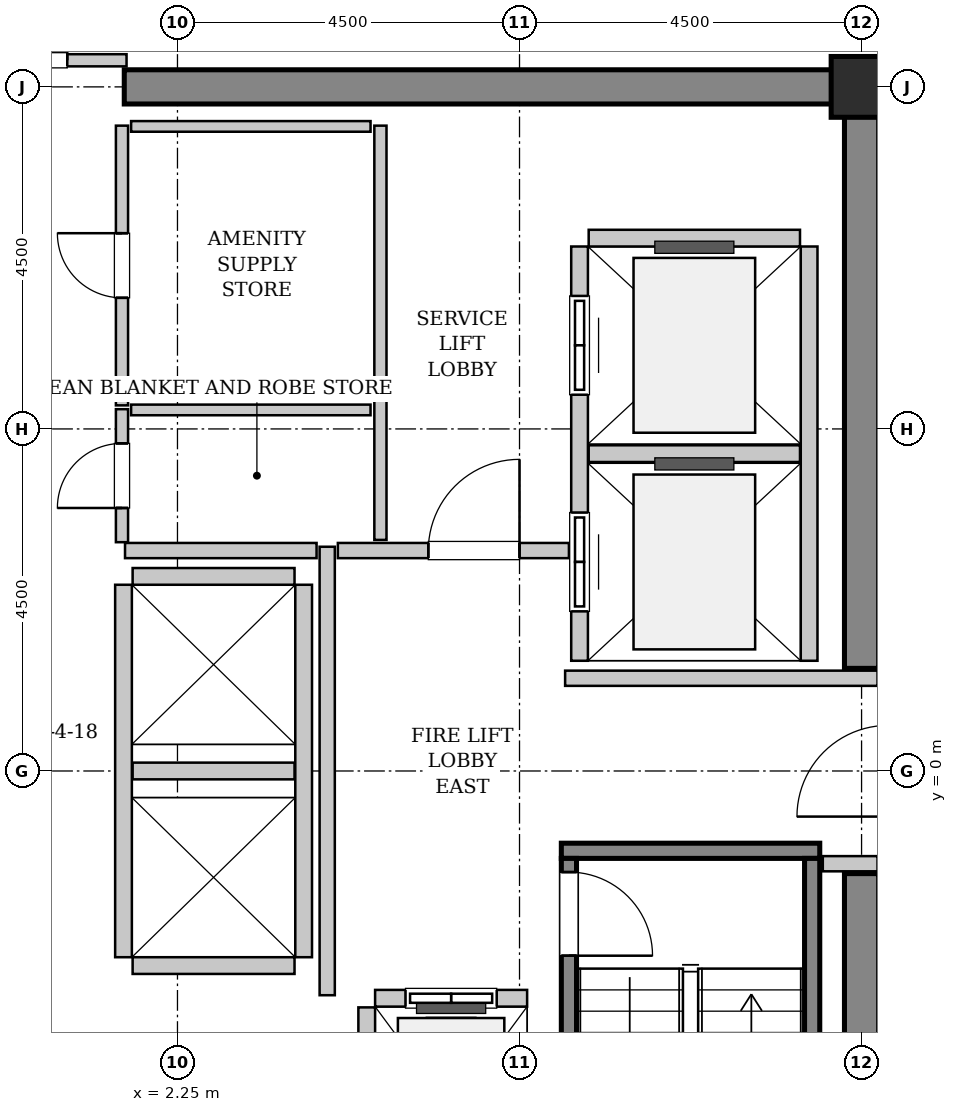
"""IFC4 building model, lengths in metres.
Left out: names, types, materials, properties, quantities, classifications, styles, units other than length and angle.
Written with IfcOpenShell. Run it as: python <this file> out.ifc"""

import sys

from ifc_helpers import new_model, si_unit, direction, frame, frame_2d, origin, origin_2d, place, context, subcontext, project, spatial, rectangle, hollow_rectangle, extrude, source, transform, mapped, element, fill, save


model = new_model("IFC4")
c1 = context("Model", 3, precision=1e-05, world=origin(), true_north=direction((0.0, 1.0)))
c2 = subcontext(c1, "Body", "Model", "MODEL_VIEW")
j1 = project(units=[si_unit("LENGTHUNIT", "METRE"), si_unit("PLANEANGLEUNIT", "RADIAN")], contexts=[c1])
p1 = place(None, origin())
s1 = spatial("IfcSite", under=j1, at=p1, CompositionType="ELEMENT")
p2 = place(p1, origin())
s2 = spatial("IfcBuilding", under=s1, at=p2, CompositionType="ELEMENT")
p3 = place(p2, frame((0.0, 0.0, 206.6)))
s3 = spatial("IfcBuildingStorey", under=s2, at=p3, CompositionType="ELEMENT", Elevation=206.6)
m1 = source(origin(), c2, "Body", "SweptSolid", [
    extrude(rectangle(XDim=9.925, YDim=0.45, at=frame_2d((4.962, 0.0))), origin(), (0.0, 0.0, 1.0), 3.8),
])
p4 = place(p3, frame((1.55, 9.0, 0.0), z_axis=(0.0, 0.0, 1.0), x_axis=(1.0, 0.0, 0.0)))
e1 = element("IfcWall", 1, at=p4, inside=s3, PredefinedType="SHEAR", context=c2, shape_type="MappedRepresentation", body=[
    mapped(m1, transform((0.0, 0.0, 0.0), x_axis=(1.0, 0.0, 0.0), y_axis=(0.0, 1.0, 0.0), z_axis=(0.0, 0.0, 1.0), scale=1.0)),
])
m2 = source(origin(), c2, "Body", "SweptSolid", [
    extrude(rectangle(XDim=7.425, YDim=0.45, at=frame_2d((3.712, 0.0))), origin(), (0.0, 0.0, 1.0), 3.8),
])
for number, where, z_axis, x_axis in (
    (2, (11.25, -8.775, 0.0), (0.0, 0.0, 1.0), (0.0, 1.0, 0.0)),
    (3, (11.25, 1.35, 0.0), (0.0, 0.0, 1.0), (0.0, 1.0, 0.0)),
):
    element("IfcWall", number, at=place(p3, frame(where, z_axis=z_axis, x_axis=x_axis)), inside=s3, PredefinedType="SHEAR", context=c2, shape_type="MappedRepresentation", body=[
        mapped(m2, transform((0.0, 0.0, 0.0), x_axis=(1.0, 0.0, 0.0), y_axis=(0.0, 1.0, 0.0), z_axis=(0.0, 0.0, 1.0), scale=1.0)),
    ])
m3 = source(origin(), c2, "Body", "SweptSolid", [
    extrude(hollow_rectangle(XDim=0.8, YDim=0.8, WallThickness=0.04, InnerFilletRadius=0.04, OuterFilletRadius=0.08, at=origin_2d()), origin(), (0.0, 0.0, 1.0), 3.8),
])
p5 = place(p3, frame((11.25, 9.0, 0.0), z_axis=(0.0, 0.0, 1.0), x_axis=(1.0, 0.0, 0.0)))
e4 = element("IfcColumn", 4, at=p5, inside=s3, PredefinedType="COLUMN", context=c2, shape_type="MappedRepresentation", body=[
    mapped(m3, transform((0.0, 0.0, 0.0), x_axis=(1.0, 0.0, 0.0), y_axis=(0.0, 1.0, 0.0), z_axis=(0.0, 0.0, 1.0), scale=1.0)),
])
m4 = source(origin(), c2, "Body", "SweptSolid", [
    extrude(rectangle(XDim=3.4, YDim=0.2, at=frame_2d((1.7, 0.0))), origin(), (0.0, 0.0, 1.0), 3.8),
])
p6 = place(p3, frame((7.3, -1.05, 0.0), z_axis=(0.0, 0.0, 1.0), x_axis=(1.0, 0.0, 0.0)))
e5 = element("IfcWall", 5, at=p6, inside=s3, PredefinedType="SOLIDWALL", context=c2, shape_type="MappedRepresentation", body=[
    mapped(m4, transform((0.0, 0.0, 0.0), x_axis=(1.0, 0.0, 0.0), y_axis=(0.0, 1.0, 0.0), z_axis=(0.0, 0.0, 1.0), scale=1.0)),
])
m5 = source(origin(), c2, "Body", "SweptSolid", [
    extrude(rectangle(XDim=7.1, YDim=0.2, at=frame_2d((3.55, 0.0))), origin(), (0.0, 0.0, 1.0), 3.8),
])
p7 = place(p3, frame((7.4, -1.15, 0.0), z_axis=(0.0, 0.0, 1.0), x_axis=(0.0, -1.0, 0.0)))
e6 = element("IfcWall", 6, at=p7, inside=s3, PredefinedType="SOLIDWALL", context=c2, shape_type="MappedRepresentation", body=[
    mapped(m5, transform((0.0, 0.0, 0.0), x_axis=(1.0, 0.0, 0.0), y_axis=(0.0, 1.0, 0.0), z_axis=(0.0, 0.0, 1.0), scale=1.0)),
])
p8 = place(p7, frame((0.18, 0.0, 0.0)))
e7 = element("IfcOpeningElement", 7, at=p8, cuts=e6, PredefinedType="OPENING", context=c2, shape_type="SweptSolid", body=[
    extrude(rectangle(XDim=1.1, YDim=2.15, at=frame_2d((0.55, 1.075))), frame((0.0, 0.11, 0.0), z_axis=(0.0, -1.0, 0.0), x_axis=(1.0, 0.0, 0.0)), (0.0, 0.0, 1.0), 0.22),
])
p9 = place(p3, frame((10.6, -1.15, 0.0), z_axis=(0.0, 0.0, 1.0), x_axis=(0.0, -1.0, 0.0)))
e8 = element("IfcWall", 8, at=p9, inside=s3, PredefinedType="SOLIDWALL", context=c2, shape_type="MappedRepresentation", body=[
    mapped(m5, transform((0.0, 0.0, 0.0), x_axis=(1.0, 0.0, 0.0), y_axis=(0.0, 1.0, 0.0), z_axis=(0.0, 0.0, 1.0), scale=1.0)),
])
m6 = source(origin(), c2, "Body", "SweptSolid", [
    extrude(rectangle(XDim=2.0, YDim=0.22, at=frame_2d((1.0, 0.0))), origin(), (0.0, 0.0, 1.0), 3.535),
])
p10 = place(p3, frame((6.85, -2.99, 0.0), z_axis=(0.0, 0.0, 1.0), x_axis=(-1.0, 0.0, 0.0)))
e9 = element("IfcWall", 9, at=p10, inside=s3, PredefinedType="SOLIDWALL", context=c2, shape_type="MappedRepresentation", body=[
    mapped(m6, transform((0.0, 0.0, 0.0), x_axis=(1.0, 0.0, 0.0), y_axis=(0.0, 1.0, 0.0), z_axis=(0.0, 0.0, 1.0), scale=1.0)),
])
p11 = place(p10, frame((0.4, 0.0, 0.0)))
e10 = element("IfcOpeningElement", 10, at=p11, cuts=e9, PredefinedType="OPENING", context=c2, shape_type="SweptSolid", body=[
    extrude(rectangle(XDim=1.2, YDim=2.2, at=frame_2d((0.6, 1.1))), frame((0.0, 0.12, 0.0), z_axis=(0.0, -1.0, 0.0), x_axis=(1.0, 0.0, 0.0)), (0.0, 0.0, 1.0), 0.24),
])
m7 = source(origin(), c2, "Body", "SweptSolid", [
    extrude(rectangle(XDim=2.68, YDim=0.22, at=frame_2d((1.34, 0.0))), origin(), (0.0, 0.0, 1.0), 3.535),
])
p12 = place(p3, frame((4.74, -3.11, 0.0), z_axis=(0.0, 0.0, 1.0), x_axis=(0.0, -1.0, 0.0)))
e11 = element("IfcWall", 11, at=p12, inside=s3, PredefinedType="SOLIDWALL", context=c2, shape_type="MappedRepresentation", body=[
    mapped(m7, transform((0.0, 0.0, 0.0), x_axis=(1.0, 0.0, 0.0), y_axis=(0.0, 1.0, 0.0), z_axis=(0.0, 0.0, 1.0), scale=1.0)),
])
m8 = source(origin(), c2, "Body", "SweptSolid", [
    extrude(rectangle(XDim=5.45, YDim=0.22, at=frame_2d((2.725, 0.0))), origin(), (0.0, 0.0, 1.0), 3.535),
])
p13 = place(p3, frame((7.54, 6.9, 0.0), z_axis=(0.0, 0.0, 1.0), x_axis=(0.0, -1.0, 0.0)))
e12 = element("IfcWall", 12, at=p13, inside=s3, PredefinedType="SOLIDWALL", context=c2, shape_type="MappedRepresentation", body=[
    mapped(m8, transform((0.0, 0.0, 0.0), x_axis=(1.0, 0.0, 0.0), y_axis=(0.0, 1.0, 0.0), z_axis=(0.0, 0.0, 1.0), scale=1.0)),
])
p14 = place(p13, frame((3.5, 0.0, 0.0)))
e13 = element("IfcOpeningElement", 13, at=p14, cuts=e12, PredefinedType="OPENING", context=c2, shape_type="SweptSolid", body=[
    extrude(rectangle(XDim=1.3, YDim=2.3, at=frame_2d((0.65, 1.15))), frame((0.0, 0.12, 0.0), z_axis=(0.0, -1.0, 0.0), x_axis=(1.0, 0.0, 0.0)), (0.0, 0.0, 1.0), 0.24),
])
p15 = place(p13, frame((0.65, 0.0, 0.0)))
e14 = element("IfcOpeningElement", 14, at=p15, cuts=e12, PredefinedType="OPENING", context=c2, shape_type="SweptSolid", body=[
    extrude(rectangle(XDim=1.3, YDim=2.3, at=frame_2d((0.65, 1.15))), frame((0.0, 0.12, 0.0), z_axis=(0.0, -1.0, 0.0), x_axis=(1.0, 0.0, 0.0)), (0.0, 0.0, 1.0), 0.24),
])
p16 = place(p3, frame((10.56, 1.45, 0.0), z_axis=(0.0, 0.0, 1.0), x_axis=(0.0, 1.0, 0.0)))
e15 = element("IfcWall", 15, at=p16, inside=s3, PredefinedType="SOLIDWALL", context=c2, shape_type="MappedRepresentation", body=[
    mapped(m8, transform((0.0, 0.0, 0.0), x_axis=(1.0, 0.0, 0.0), y_axis=(0.0, 1.0, 0.0), z_axis=(0.0, 0.0, 1.0), scale=1.0)),
])
m9 = source(origin(), c2, "Body", "SweptSolid", [
    extrude(rectangle(XDim=2.78, YDim=0.22, at=frame_2d((1.39, 0.0))), origin(), (0.0, 0.0, 1.0), 3.535),
])
for number, where, z_axis, x_axis in (
    (16, (7.66, 4.175, 0.0), (0.0, 0.0, 1.0), (1.0, 0.0, 0.0)),
    (17, (10.44, 7.01, 0.0), (0.0, 0.0, 1.0), (-1.0, 0.0, 0.0)),
):
    element("IfcWall", number, at=place(p3, frame(where, z_axis=z_axis, x_axis=x_axis)), inside=s3, PredefinedType="SOLIDWALL", context=c2, shape_type="MappedRepresentation", body=[
        mapped(m9, transform((0.0, 0.0, 0.0), x_axis=(1.0, 0.0, 0.0), y_axis=(0.0, 1.0, 0.0), z_axis=(0.0, 0.0, 1.0), scale=1.0)),
    ])
m10 = source(origin(), c2, "Body", "SweptSolid", [
    extrude(rectangle(XDim=4.9, YDim=0.22, at=frame_2d((2.45, 0.0))), origin(), (0.0, 0.0, 1.0), 3.535),
])
for number, where, z_axis, x_axis in (
    (18, (1.54, 2.45, 0.0), (0.0, 0.0, 1.0), (0.0, -1.0, 0.0)),
    (19, (3.91, -2.45, 0.0), (0.0, 0.0, 1.0), (0.0, 1.0, 0.0)),
):
    element("IfcWall", number, at=place(p3, frame(where, z_axis=z_axis, x_axis=x_axis)), inside=s3, PredefinedType="SOLIDWALL", context=c2, shape_type="MappedRepresentation", body=[
        mapped(m10, transform((0.0, 0.0, 0.0), x_axis=(1.0, 0.0, 0.0), y_axis=(0.0, 1.0, 0.0), z_axis=(0.0, 0.0, 1.0), scale=1.0)),
    ])
m11 = source(origin(), c2, "Body", "SweptSolid", [
    extrude(rectangle(XDim=2.13, YDim=0.22, at=frame_2d((1.065, 0.0))), origin(), (0.0, 0.0, 1.0), 3.535),
])
for number, where, z_axis, x_axis in (
    (20, (1.66, -2.56, 0.0), (0.0, 0.0, 1.0), (1.0, 0.0, 0.0)),
    (21, (1.66, 0.0, 0.0), (0.0, 0.0, 1.0), (1.0, 0.0, 0.0)),
    (22, (3.79, 2.56, 0.0), (0.0, 0.0, 1.0), (-1.0, 0.0, 0.0)),
):
    element("IfcWall", number, at=place(p3, frame(where, z_axis=z_axis, x_axis=x_axis)), inside=s3, PredefinedType="SOLIDWALL", context=c2, shape_type="MappedRepresentation", body=[
        mapped(m11, transform((0.0, 0.0, 0.0), x_axis=(1.0, 0.0, 0.0), y_axis=(0.0, 1.0, 0.0), z_axis=(0.0, 0.0, 1.0), scale=1.0)),
    ])
m12 = source(origin(), c2, "Body", "SweptSolid", [
    extrude(rectangle(XDim=5.9, YDim=0.2, at=frame_2d((2.95, 0.0))), origin(), (0.0, 0.0, 1.0), 3.535),
])
p17 = place(p3, frame((4.22, -2.95, 0.0), z_axis=(0.0, 0.0, 1.0), x_axis=(0.0, 1.0, 0.0)))
e23 = element("IfcWall", 23, at=p17, inside=s3, PredefinedType="PARTITIONING", context=c2, shape_type="MappedRepresentation", body=[
    mapped(m12, transform((0.0, 0.0, 0.0), x_axis=(1.0, 0.0, 0.0), y_axis=(0.0, 1.0, 0.0), z_axis=(0.0, 0.0, 1.0), scale=1.0)),
])
m13 = source(origin(), c2, "Body", "SweptSolid", [
    extrude(rectangle(XDim=2.52, YDim=0.2, at=frame_2d((1.26, 0.0))), origin(), (0.0, 0.0, 1.0), 3.535),
])
p18 = place(p3, frame((1.56, 2.9, 0.0), z_axis=(0.0, 0.0, 1.0), x_axis=(1.0, 0.0, 0.0)))
e24 = element("IfcWall", 24, at=p18, inside=s3, PredefinedType="PARTITIONING", context=c2, shape_type="MappedRepresentation", body=[
    mapped(m13, transform((0.0, 0.0, 0.0), x_axis=(1.0, 0.0, 0.0), y_axis=(0.0, 1.0, 0.0), z_axis=(0.0, 0.0, 1.0), scale=1.0)),
])
m14 = source(origin(), c2, "Body", "SweptSolid", [
    extrude(rectangle(XDim=3.04, YDim=0.2, at=frame_2d((1.52, 0.0))), origin(), (0.0, 0.0, 1.0), 3.535),
])
p19 = place(p3, frame((4.36, 2.9, 0.0), z_axis=(0.0, 0.0, 1.0), x_axis=(1.0, 0.0, 0.0)))
e25 = element("IfcWall", 25, at=p19, inside=s3, PredefinedType="PARTITIONING", context=c2, shape_type="MappedRepresentation", body=[
    mapped(m14, transform((0.0, 0.0, 0.0), x_axis=(1.0, 0.0, 0.0), y_axis=(0.0, 1.0, 0.0), z_axis=(0.0, 0.0, 1.0), scale=1.0)),
])
p20 = place(p19, frame((1.19, 0.0, 0.0)))
e26 = element("IfcOpeningElement", 26, at=p20, cuts=e25, PredefinedType="OPENING", context=c2, shape_type="SweptSolid", body=[
    extrude(rectangle(XDim=1.2, YDim=2.15, at=frame_2d((0.6, 1.075))), frame((0.0, 0.11, 0.0), z_axis=(0.0, -1.0, 0.0), x_axis=(1.0, 0.0, 0.0)), (0.0, 0.0, 1.0), 0.22),
])
m15 = source(origin(), c2, "Body", "SweptSolid", [
    extrude(rectangle(XDim=4.11, YDim=0.2, at=frame_2d((2.055, 0.0))), origin(), (0.0, 0.0, 1.0), 3.535),
])
p21 = place(p3, frame((7.35, 1.22, 0.0), z_axis=(0.0, 0.0, 1.0), x_axis=(1.0, 0.0, 0.0)))
e27 = element("IfcWall", 27, at=p21, inside=s3, PredefinedType="PARTITIONING", context=c2, shape_type="MappedRepresentation", body=[
    mapped(m15, transform((0.0, 0.0, 0.0), x_axis=(1.0, 0.0, 0.0), y_axis=(0.0, 1.0, 0.0), z_axis=(0.0, 0.0, 1.0), scale=1.0)),
])
m16 = source(origin(), c2, "Body", "SweptSolid", [
    extrude(rectangle(XDim=0.72, YDim=0.2, at=frame_2d((0.36, 0.0))), origin(), (0.0, 0.0, 1.0), 3.535),
])
p22 = place(p3, frame((10.74, -1.22, 0.0), z_axis=(0.0, 0.0, 1.0), x_axis=(1.0, 0.0, 0.0)))
e28 = element("IfcWall", 28, at=p22, inside=s3, PredefinedType="PARTITIONING", context=c2, shape_type="MappedRepresentation", body=[
    mapped(m16, transform((0.0, 0.0, 0.0), x_axis=(1.0, 0.0, 0.0), y_axis=(0.0, 1.0, 0.0), z_axis=(0.0, 0.0, 1.0), scale=1.0)),
])
m17 = source(origin(), c2, "Body", "SweptSolid", [
    extrude(rectangle(XDim=3.16, YDim=0.16, at=frame_2d((1.58, 0.0))), origin(), (0.0, 0.0, 1.0), 2.625),
])
p23 = place(p3, frame((-1.58, 9.35, 0.0), z_axis=(0.0, 0.0, 1.0), x_axis=(1.0, 0.0, 0.0)))
e29 = element("IfcWall", 29, at=p23, inside=s3, PredefinedType="PARTITIONING", context=c2, shape_type="MappedRepresentation", body=[
    mapped(m17, transform((0.0, 0.0, 0.0), x_axis=(1.0, 0.0, 0.0), y_axis=(0.0, 1.0, 0.0), z_axis=(0.0, 0.0, 1.0), scale=1.0)),
])
p24 = place(p23, frame((0.78, 0.0, 0.0)))
e30 = element("IfcOpeningElement", 30, at=p24, cuts=e29, PredefinedType="OPENING", context=c2, shape_type="SweptSolid", body=[
    extrude(rectangle(XDim=1.6, YDim=2.3, at=frame_2d((0.8, 1.15))), frame((0.0, 0.09, 0.0), z_axis=(0.0, -1.0, 0.0), x_axis=(1.0, 0.0, 0.0)), (0.0, 0.0, 1.0), 0.18),
])
m18 = source(origin(), c2, "Body", "SweptSolid", [
    extrude(rectangle(XDim=5.45, YDim=0.16, at=frame_2d((2.725, 0.0))), origin(), (0.0, 0.0, 1.0), 3.535),
])
p25 = place(p3, frame((4.92, 3.04, 0.0), z_axis=(0.0, 0.0, 1.0), x_axis=(0.0, 1.0, 0.0)))
e31 = element("IfcWall", 31, at=p25, inside=s3, PredefinedType="PARTITIONING", context=c2, shape_type="MappedRepresentation", body=[
    mapped(m18, transform((0.0, 0.0, 0.0), x_axis=(1.0, 0.0, 0.0), y_axis=(0.0, 1.0, 0.0), z_axis=(0.0, 0.0, 1.0), scale=1.0)),
])
m19 = source(origin(), c2, "Body", "SweptSolid", [
    extrude(rectangle(XDim=1.75, YDim=0.16, at=frame_2d((0.875, 0.0))), origin(), (0.0, 0.0, 1.0), 3.535),
])
p26 = place(p3, frame((1.52, 3.01, 0.0), z_axis=(0.0, 0.0, 1.0), x_axis=(0.0, 1.0, 0.0)))
e32 = element("IfcWall", 32, at=p26, inside=s3, PredefinedType="PARTITIONING", context=c2, shape_type="MappedRepresentation", body=[
    mapped(m19, transform((0.0, 0.0, 0.0), x_axis=(1.0, 0.0, 0.0), y_axis=(0.0, 1.0, 0.0), z_axis=(0.0, 0.0, 1.0), scale=1.0)),
])
p27 = place(p26, frame((0.45, 0.0, 0.0)))
e33 = element("IfcOpeningElement", 33, at=p27, cuts=e32, PredefinedType="OPENING", context=c2, shape_type="SweptSolid", body=[
    extrude(rectangle(XDim=0.85, YDim=2.1, at=frame_2d((0.425, 1.05))), frame((0.0, 0.09, 0.0), z_axis=(0.0, -1.0, 0.0), x_axis=(1.0, 0.0, 0.0)), (0.0, 0.0, 1.0), 0.18),
])
m20 = source(origin(), c2, "Body", "SweptSolid", [
    extrude(rectangle(XDim=3.15, YDim=0.14, at=frame_2d((1.575, 0.0))), origin(), (0.0, 0.0, 1.0), 3.535),
])
p28 = place(p3, frame((1.64, 4.75, 0.0), z_axis=(0.0, 0.0, 1.0), x_axis=(1.0, 0.0, 0.0)))
e34 = element("IfcWall", 34, at=p28, inside=s3, PredefinedType="PARTITIONING", context=c2, shape_type="MappedRepresentation", body=[
    mapped(m20, transform((0.0, 0.0, 0.0), x_axis=(1.0, 0.0, 0.0), y_axis=(0.0, 1.0, 0.0), z_axis=(0.0, 0.0, 1.0), scale=1.0)),
])
m21 = source(origin(), c2, "Body", "SweptSolid", [
    extrude(rectangle(XDim=3.68, YDim=0.16, at=frame_2d((1.84, 0.0))), origin(), (0.0, 0.0, 1.0), 3.535),
])
p29 = place(p3, frame((1.52, 4.81, 0.0), z_axis=(0.0, 0.0, 1.0), x_axis=(0.0, 1.0, 0.0)))
e35 = element("IfcWall", 35, at=p29, inside=s3, PredefinedType="PARTITIONING", context=c2, shape_type="MappedRepresentation", body=[
    mapped(m21, transform((0.0, 0.0, 0.0), x_axis=(1.0, 0.0, 0.0), y_axis=(0.0, 1.0, 0.0), z_axis=(0.0, 0.0, 1.0), scale=1.0)),
])
p30 = place(p29, frame((1.415, 0.0, 0.0)))
e36 = element("IfcOpeningElement", 36, at=p30, cuts=e35, PredefinedType="OPENING", context=c2, shape_type="SweptSolid", body=[
    extrude(rectangle(XDim=0.85, YDim=2.1, at=frame_2d((0.425, 1.05))), frame((0.0, 0.09, 0.0), z_axis=(0.0, -1.0, 0.0), x_axis=(1.0, 0.0, 0.0)), (0.0, 0.0, 1.0), 0.18),
])
p31 = place(p3, frame((1.64, 8.48, 0.0), z_axis=(0.0, 0.0, 1.0), x_axis=(1.0, 0.0, 0.0)))
e37 = element("IfcWall", 37, at=p31, inside=s3, PredefinedType="PARTITIONING", context=c2, shape_type="MappedRepresentation", body=[
    mapped(m20, transform((0.0, 0.0, 0.0), x_axis=(1.0, 0.0, 0.0), y_axis=(0.0, 1.0, 0.0), z_axis=(0.0, 0.0, 1.0), scale=1.0)),
])
m22 = source(origin(), c2, "Body", "SweptSolid", [
    extrude(rectangle(XDim=1.1, YDim=2.15, at=frame_2d((0.55, 1.075))), frame((0.0, 0.025, 0.0), z_axis=(0.0, -1.0, 0.0), x_axis=(1.0, 0.0, 0.0)), (0.0, 0.0, 1.0), 0.05),
])
p32 = place(p8, origin())
e38 = element("IfcDoor", 38, at=p32, inside=s3, OperationType="SINGLE_SWING_RIGHT", PredefinedType="DOOR", context=c2, shape_type="MappedRepresentation", body=[
    mapped(m22, transform((0.0, 0.0, 0.0), x_axis=(1.0, 0.0, 0.0), y_axis=(0.0, 1.0, 0.0), z_axis=(0.0, 0.0, 1.0), scale=1.0)),
])
fill(e7, e38)
m23 = source(origin(), c2, "Body", "SweptSolid", [
    extrude(rectangle(XDim=1.2, YDim=2.2, at=frame_2d((0.6, 1.1))), frame((0.0, 0.025, 0.0), z_axis=(0.0, -1.0, 0.0), x_axis=(1.0, 0.0, 0.0)), (0.0, 0.0, 1.0), 0.05),
])
p33 = place(p11, origin())
e39 = element("IfcDoor", 39, at=p33, inside=s3, OperationType="SLIDING_TO_LEFT", PredefinedType="DOOR", context=c2, shape_type="MappedRepresentation", body=[
    mapped(m23, transform((0.0, 0.0, 0.0), x_axis=(1.0, 0.0, 0.0), y_axis=(0.0, 1.0, 0.0), z_axis=(0.0, 0.0, 1.0), scale=1.0)),
])
fill(e10, e39)
m24 = source(origin(), c2, "Body", "SweptSolid", [
    extrude(rectangle(XDim=1.3, YDim=2.3, at=frame_2d((0.65, 1.15))), frame((0.0, 0.025, 0.0), z_axis=(0.0, -1.0, 0.0), x_axis=(1.0, 0.0, 0.0)), (0.0, 0.0, 1.0), 0.05),
])
p34 = place(p14, origin())
e40 = element("IfcDoor", 40, at=p34, inside=s3, OperationType="SLIDING_TO_RIGHT", PredefinedType="DOOR", context=c2, shape_type="MappedRepresentation", body=[
    mapped(m24, transform((0.0, 0.0, 0.0), x_axis=(1.0, 0.0, 0.0), y_axis=(0.0, 1.0, 0.0), z_axis=(0.0, 0.0, 1.0), scale=1.0)),
])
fill(e13, e40)
p35 = place(p15, origin())
e41 = element("IfcDoor", 41, at=p35, inside=s3, OperationType="SLIDING_TO_RIGHT", PredefinedType="DOOR", context=c2, shape_type="MappedRepresentation", body=[
    mapped(m24, transform((0.0, 0.0, 0.0), x_axis=(1.0, 0.0, 0.0), y_axis=(0.0, 1.0, 0.0), z_axis=(0.0, 0.0, 1.0), scale=1.0)),
])
fill(e14, e41)
m25 = source(origin(), c2, "Body", "SweptSolid", [
    extrude(rectangle(XDim=1.2, YDim=2.15, at=frame_2d((0.6, 1.075))), frame((0.0, 0.025, 0.0), z_axis=(0.0, -1.0, 0.0), x_axis=(1.0, 0.0, 0.0)), (0.0, 0.0, 1.0), 0.05),
])
p36 = place(p20, origin())
e42 = element("IfcDoor", 42, at=p36, inside=s3, OperationType="SINGLE_SWING_RIGHT", PredefinedType="DOOR", context=c2, shape_type="MappedRepresentation", body=[
    mapped(m25, transform((0.0, 0.0, 0.0), x_axis=(1.0, 0.0, 0.0), y_axis=(0.0, 1.0, 0.0), z_axis=(0.0, 0.0, 1.0), scale=1.0)),
])
fill(e26, e42)
m26 = source(origin(), c2, "Body", "SweptSolid", [
    extrude(rectangle(XDim=1.6, YDim=2.3, at=frame_2d((0.8, 1.15))), frame((0.0, 0.025, 0.0), z_axis=(0.0, -1.0, 0.0), x_axis=(1.0, 0.0, 0.0)), (0.0, 0.0, 1.0), 0.05),
])
p37 = place(p24, origin())
e43 = element("IfcDoor", 43, at=p37, inside=s3, OperationType="DOUBLE_DOOR_SINGLE_SWING", PredefinedType="DOOR", context=c2, shape_type="MappedRepresentation", body=[
    mapped(m26, transform((0.0, 0.0, 0.0), x_axis=(1.0, 0.0, 0.0), y_axis=(0.0, 1.0, 0.0), z_axis=(0.0, 0.0, 1.0), scale=1.0)),
])
fill(e30, e43)
m27 = source(origin(), c2, "Body", "SweptSolid", [
    extrude(rectangle(XDim=0.85, YDim=2.1, at=frame_2d((0.425, 1.05))), frame((0.0, 0.025, 0.0), z_axis=(0.0, -1.0, 0.0), x_axis=(1.0, 0.0, 0.0)), (0.0, 0.0, 1.0), 0.05),
])
p38 = place(p27, origin())
e44 = element("IfcDoor", 44, at=p38, inside=s3, OperationType="SINGLE_SWING_LEFT", PredefinedType="DOOR", context=c2, shape_type="MappedRepresentation", body=[
    mapped(m27, transform((0.0, 0.0, 0.0), x_axis=(1.0, 0.0, 0.0), y_axis=(0.0, 1.0, 0.0), z_axis=(0.0, 0.0, 1.0), scale=1.0)),
])
fill(e33, e44)
p39 = place(p30, origin())
e45 = element("IfcDoor", 45, at=p39, inside=s3, OperationType="SINGLE_SWING_RIGHT", PredefinedType="DOOR", context=c2, shape_type="MappedRepresentation", body=[
    mapped(m27, transform((0.0, 0.0, 0.0), x_axis=(1.0, 0.0, 0.0), y_axis=(0.0, 1.0, 0.0), z_axis=(0.0, 0.0, 1.0), scale=1.0)),
])
fill(e36, e45)
save(model, sys.argv[1])
